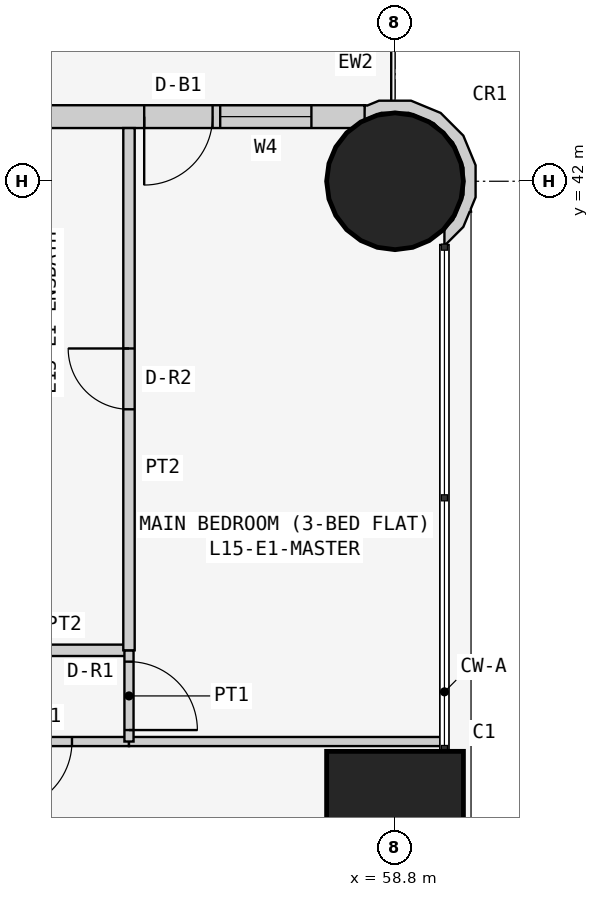
"""IFC4 building model, lengths in metres.
Left out: names, types, materials, properties, quantities, classifications, styles, units other than length and angle.
Written with IfcOpenShell. Run it as: python <this file> out.ifc"""

import sys

from ifc_helpers import new_model, si_unit, direction, frame, frame_2d, origin, origin_2d, place, context, subcontext, project, spatial, polyline, rectangle, circle, outline, extrude, element, fill, save


model = new_model("IFC4")
c1 = context("Model", 3, precision=1e-05, world=origin(), true_north=direction((0.0, 1.0)))
c2 = subcontext(c1, "Body", "Model", "MODEL_VIEW")
j1 = project(units=[si_unit("LENGTHUNIT", "METRE"), si_unit("PLANEANGLEUNIT", "RADIAN")], contexts=[c1])
p1 = place(None, origin())
s1 = spatial("IfcSite", under=j1, at=p1, CompositionType="ELEMENT")
p2 = place(p1, origin())
s2 = spatial("IfcBuilding", under=s1, at=p2, CompositionType="ELEMENT")
p3 = place(p2, frame((0.0, 0.0, 63.3)))
s3 = spatial("IfcBuildingStorey", under=s2, at=p3, CompositionType="ELEMENT", Elevation=63.3)
p4 = place(p3, frame((58.8, 33.6, 0.0), z_axis=(0.0, 0.0, 1.0), x_axis=(1.0, 0.0, 0.0)))
e1 = element("IfcColumn", 1, at=p4, inside=s3, PredefinedType="COLUMN", context=c2, shape_type="SweptSolid", body=[
    extrude(rectangle(XDim=1.8, YDim=1.8, at=origin_2d()), origin(), (0.0, 0.0, 1.0), 3.6),
])
p5 = place(p3, frame((58.8, 42.0, 0.0), z_axis=(0.0, 0.0, 1.0), x_axis=(1.0, 0.0, 0.0)))
e2 = element("IfcColumn", 2, at=p5, inside=s3, PredefinedType="COLUMN", context=c2, shape_type="SweptSolid", body=[
    extrude(circle(Radius=0.9, at=origin_2d()), origin(), (0.0, 0.0, 1.0), 3.6),
])
p6 = place(p3, frame((58.4, 42.85, 0.0), z_axis=(0.0, 0.0, 1.0), x_axis=(-1.0, 0.0, 0.0)))
e3 = element("IfcWall", 3, at=p6, inside=s3, PredefinedType="SOLIDWALL", context=c2, shape_type="SweptSolid", body=[
    extrude(rectangle(XDim=15.7, YDim=0.3, at=frame_2d((7.85, 0.0))), origin(), (0.0, 0.0, 1.0), 3.45),
])
p7 = place(p6, frame((12.4, 0.0, 0.9)))
e4 = element("IfcOpeningElement", 4, at=p7, cuts=e3, PredefinedType="OPENING", context=c2, shape_type="SweptSolid", body=[
    extrude(rectangle(XDim=1.8, YDim=1.5, at=frame_2d((0.9, 0.75))), frame((0.0, 0.16, 0.0), z_axis=(0.0, -1.0, 0.0), x_axis=(1.0, 0.0, 0.0)), (0.0, 0.0, 1.0), 0.32),
])
p8 = place(p6, frame((9.55, 0.0, 1.5)))
e5 = element("IfcOpeningElement", 5, at=p8, cuts=e3, PredefinedType="OPENING", context=c2, shape_type="SweptSolid", body=[
    extrude(rectangle(XDim=0.9, YDim=0.7, at=frame_2d((0.45, 0.35))), frame((0.0, 0.16, 0.0), z_axis=(0.0, -1.0, 0.0), x_axis=(1.0, 0.0, 0.0)), (0.0, 0.0, 1.0), 0.32),
])
p9 = place(p6, frame((5.1, 0.0, 0.9)))
e6 = element("IfcOpeningElement", 6, at=p9, cuts=e3, PredefinedType="OPENING", context=c2, shape_type="SweptSolid", body=[
    extrude(rectangle(XDim=1.8, YDim=1.5, at=frame_2d((0.9, 0.75))), frame((0.0, 0.16, 0.0), z_axis=(0.0, -1.0, 0.0), x_axis=(1.0, 0.0, 0.0)), (0.0, 0.0, 1.0), 0.32),
])
p10 = place(p6, frame((2.0, 0.0, 0.0)))
e7 = element("IfcOpeningElement", 7, at=p10, cuts=e3, PredefinedType="OPENING", context=c2, shape_type="SweptSolid", body=[
    extrude(rectangle(XDim=0.9, YDim=2.4, at=frame_2d((0.45, 1.2))), frame((0.0, 0.16, 0.0), z_axis=(0.0, -1.0, 0.0), x_axis=(1.0, 0.0, 0.0)), (0.0, 0.0, 1.0), 0.32),
])
p11 = place(p6, frame((0.7, 0.0, 0.9)))
e8 = element("IfcOpeningElement", 8, at=p11, cuts=e3, PredefinedType="OPENING", context=c2, shape_type="SweptSolid", body=[
    extrude(rectangle(XDim=1.2, YDim=1.5, at=frame_2d((0.6, 0.75))), frame((0.0, 0.16, 0.0), z_axis=(0.0, -1.0, 0.0), x_axis=(1.0, 0.0, 0.0)), (0.0, 0.0, 1.0), 0.32),
])
p12 = place(p3, frame((59.411, 41.233, 0.0), z_axis=(0.0, 0.0, 1.0), x_axis=(0.926129809145, 0.377204953059, 0.0)))
e9 = element("IfcWall", 9, at=p12, inside=s3, PredefinedType="SOLIDWALL", context=c2, shape_type="SweptSolid", body=[
    extrude(outline(polyline([(0.626, 0.345), (0.785, 0.736), (0.782, 1.157), (0.619, 1.546), (0.319, 1.843), (-0.072, 2.002), (-0.24, 2.001), (-0.27, 2.017), (-0.37, 1.841), (-0.102, 1.842), (0.23, 1.707), (0.485, 1.455), (0.624, 1.125), (0.626, 0.766), (0.491, 0.434), (0.238, 0.179), (0.09, 0.117), (0.011, -0.078), (0.024, -0.083), (0.329, 0.045), (0.48, 0.198), (0.499, 0.193), (0.508, 0.225), (0.626, 0.345)])), origin(), (0.0, 0.0, 1.0), 3.45),
])
p13 = place(p3, frame((55.3, 34.629, 0.0), z_axis=(0.0, 0.0, 1.0), x_axis=(-1.0, 0.0, 0.0)))
e10 = element("IfcWall", 10, at=p13, inside=s3, PredefinedType="PARTITIONING", context=c2, shape_type="SweptSolid", body=[
    extrude(rectangle(XDim=3.9, YDim=0.12, at=frame_2d((1.95, 0.0))), origin(), (0.0, 0.0, 1.0), 3.45),
])
p14 = place(p13, frame((0.75, 0.0, 0.0)))
e11 = element("IfcOpeningElement", 11, at=p14, cuts=e10, PredefinedType="OPENING", context=c2, shape_type="SweptSolid", body=[
    extrude(rectangle(XDim=0.9, YDim=2.1, at=frame_2d((0.45, 1.05))), frame((0.0, 0.07, 0.0), z_axis=(0.0, -1.0, 0.0), x_axis=(1.0, 0.0, 0.0)), (0.0, 0.0, 1.0), 0.14),
])
p15 = place(p3, frame((59.45, 34.629, 0.0), z_axis=(0.0, 0.0, 1.0), x_axis=(-1.0, 0.0, 0.0)))
e12 = element("IfcWall", 12, at=p15, inside=s3, PredefinedType="PARTITIONING", context=c2, shape_type="SweptSolid", body=[
    extrude(rectangle(XDim=4.15, YDim=0.12, at=frame_2d((2.075, 0.0))), origin(), (0.0, 0.0, 1.0), 3.45),
])
p16 = place(p3, frame((55.3, 35.829, 0.0), z_axis=(0.0, 0.0, 1.0), x_axis=(-1.0, 0.0, 0.0)))
e13 = element("IfcWall", 13, at=p16, inside=s3, PredefinedType="PARTITIONING", context=c2, shape_type="SweptSolid", body=[
    extrude(rectangle(XDim=1.7, YDim=0.15, at=frame_2d((0.85, 0.0))), origin(), (0.0, 0.0, 1.0), 3.45),
])
p17 = place(p3, frame((55.3, 34.629, 0.0), z_axis=(0.0, 0.0, 1.0), x_axis=(0.0, 1.0, 0.0)))
e14 = element("IfcWall", 14, at=p17, inside=s3, PredefinedType="PARTITIONING", context=c2, shape_type="SweptSolid", body=[
    extrude(rectangle(XDim=1.2, YDim=0.12, at=frame_2d((0.6, 0.0))), origin(), (0.0, 0.0, 1.0), 3.45),
])
p18 = place(p17, frame((0.151, 0.0, 0.0)))
e15 = element("IfcOpeningElement", 15, at=p18, cuts=e14, PredefinedType="OPENING", context=c2, shape_type="SweptSolid", body=[
    extrude(rectangle(XDim=0.9, YDim=2.1, at=frame_2d((0.45, 1.05))), frame((0.0, 0.07, 0.0), z_axis=(0.0, -1.0, 0.0), x_axis=(1.0, 0.0, 0.0)), (0.0, 0.0, 1.0), 0.14),
])
p19 = place(p3, frame((55.3, 35.829, 0.0), z_axis=(0.0, 0.0, 1.0), x_axis=(0.0, 1.0, 0.0)))
e16 = element("IfcWall", 16, at=p19, inside=s3, PredefinedType="PARTITIONING", context=c2, shape_type="SweptSolid", body=[
    extrude(rectangle(XDim=6.871, YDim=0.15, at=frame_2d((3.436, 0.0))), origin(), (0.0, 0.0, 1.0), 3.45),
])
p20 = place(p19, frame((3.171, 0.0, 0.0)))
e17 = element("IfcOpeningElement", 17, at=p20, cuts=e16, PredefinedType="OPENING", context=c2, shape_type="SweptSolid", body=[
    extrude(rectangle(XDim=0.8, YDim=2.1, at=frame_2d((0.4, 1.05))), frame((0.0, 0.085, 0.0), z_axis=(0.0, -1.0, 0.0), x_axis=(1.0, 0.0, 0.0)), (0.0, 0.0, 1.0), 0.17),
])
p21 = place(p10, origin())
e18 = element("IfcDoor", 18, at=p21, inside=s3, OperationType="SINGLE_SWING_RIGHT", PredefinedType="DOOR", context=c2, shape_type="SweptSolid", body=[
    extrude(rectangle(XDim=0.9, YDim=2.4, at=frame_2d((0.45, 1.2))), frame((0.0, 0.025, 0.0), z_axis=(0.0, -1.0, 0.0), x_axis=(1.0, 0.0, 0.0)), (0.0, 0.0, 1.0), 0.05),
])
fill(e7, e18)
p22 = place(p11, origin())
e19 = element("IfcWindow", 19, at=p22, inside=s3, PartitioningType="SINGLE_PANEL", PredefinedType="WINDOW", context=c2, shape_type="SweptSolid", body=[
    extrude(rectangle(XDim=1.2, YDim=1.5, at=frame_2d((0.6, 0.75))), frame((0.0, 0.03, 0.0), z_axis=(0.0, -1.0, 0.0), x_axis=(1.0, 0.0, 0.0)), (0.0, 0.0, 1.0), 0.06),
])
fill(e8, e19)
p23 = place(p14, origin())
e20 = element("IfcDoor", 20, at=p23, inside=s3, OperationType="SINGLE_SWING_RIGHT", PredefinedType="DOOR", context=c2, shape_type="SweptSolid", body=[
    extrude(rectangle(XDim=0.9, YDim=2.1, at=frame_2d((0.45, 1.05))), frame((0.0, 0.025, 0.0), z_axis=(0.0, -1.0, 0.0), x_axis=(1.0, 0.0, 0.0)), (0.0, 0.0, 1.0), 0.05),
])
fill(e11, e20)
p24 = place(p18, frame((0.9, 0.0, 0.0), z_axis=(0.0, 0.0, 1.0), x_axis=(-1.0, 0.0, 0.0)))
e21 = element("IfcDoor", 21, at=p24, inside=s3, OperationType="SINGLE_SWING_RIGHT", PredefinedType="DOOR", context=c2, shape_type="SweptSolid", body=[
    extrude(rectangle(XDim=0.9, YDim=2.1, at=frame_2d((0.45, 1.05))), frame((0.0, 0.025, 0.0), z_axis=(0.0, -1.0, 0.0), x_axis=(1.0, 0.0, 0.0)), (0.0, 0.0, 1.0), 0.05),
])
fill(e15, e21)
p25 = place(p20, origin())
e22 = element("IfcDoor", 22, at=p25, inside=s3, OperationType="SINGLE_SWING_RIGHT", PredefinedType="DOOR", context=c2, shape_type="SweptSolid", body=[
    extrude(rectangle(XDim=0.8, YDim=2.1, at=frame_2d((0.4, 1.05))), frame((0.0, 0.025, 0.0), z_axis=(0.0, -1.0, 0.0), x_axis=(1.0, 0.0, 0.0)), (0.0, 0.0, 1.0), 0.05),
])
fill(e17, e22)
save(model, sys.argv[1])
